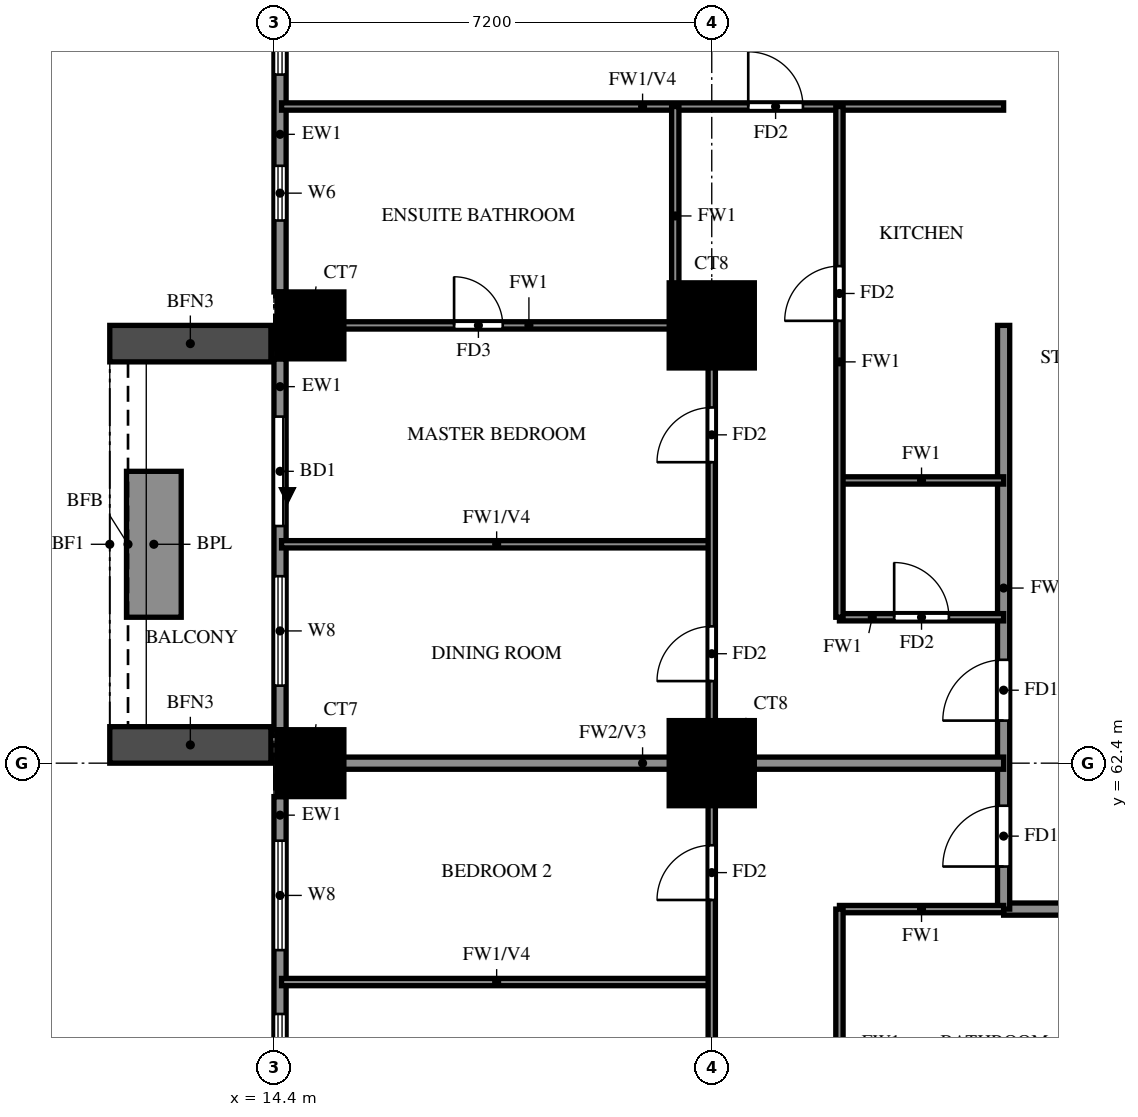
"""IFC4 building model, lengths in metres.
Left out: names, types, materials, properties, quantities, classifications, styles, units other than length and angle.
Written with IfcOpenShell. Run it as: python <this file> out.ifc"""

import sys

from ifc_helpers import new_model, si_unit, direction, frame, frame_2d, origin, origin_2d, place, context, subcontext, project, spatial, rectangle, extrude, source, transform, mapped, element, fill, save


model = new_model("IFC4")
c1 = context("Model", 3, precision=1e-05, world=origin(), true_north=direction((0.0, 1.0)))
c2 = subcontext(c1, "Body", "Model", "MODEL_VIEW")
j1 = project(units=[si_unit("LENGTHUNIT", "METRE"), si_unit("PLANEANGLEUNIT", "RADIAN")], contexts=[c1])
p1 = place(None, origin())
s1 = spatial("IfcSite", under=j1, at=p1, CompositionType="ELEMENT")
p2 = place(p1, origin())
s2 = spatial("IfcBuilding", under=s1, at=p2, CompositionType="ELEMENT")
p3 = place(p2, frame((0.0, 0.0, 37.5)))
s3 = spatial("IfcBuildingStorey", under=s2, at=p3, CompositionType="ELEMENT", Elevation=37.5)
m1 = source(origin(), c2, "Body", "SweptSolid", [
    extrude(rectangle(XDim=1.1, YDim=1.1, at=origin_2d()), origin(), (0.0, 0.0, 1.0), 3.18),
])
p4 = place(p3, frame((15.0, 62.4, 0.0), z_axis=(0.0, 0.0, 1.0), x_axis=(1.0, 0.0, 0.0)))
e1 = element("IfcColumn", 1, at=p4, inside=s3, PredefinedType="COLUMN", context=c2, shape_type="MappedRepresentation", body=[
    mapped(m1, transform((0.0, 0.0, 0.0))),
])
m2 = source(origin(), c2, "Body", "SweptSolid", [
    extrude(rectangle(XDim=1.4, YDim=1.4, at=origin_2d()), origin(), (0.0, 0.0, 1.0), 3.18),
])
p5 = place(p3, frame((21.6, 62.4, 0.0), z_axis=(0.0, 0.0, 1.0), x_axis=(1.0, 0.0, 0.0)))
e2 = element("IfcColumn", 2, at=p5, inside=s3, PredefinedType="COLUMN", context=c2, shape_type="MappedRepresentation", body=[
    mapped(m2, transform((0.0, 0.0, 0.0))),
])
p6 = place(p3, frame((15.0, 69.6, 0.0), z_axis=(0.0, 0.0, 1.0), x_axis=(1.0, 0.0, 0.0)))
e3 = element("IfcColumn", 3, at=p6, inside=s3, PredefinedType="COLUMN", context=c2, shape_type="MappedRepresentation", body=[
    mapped(m1, transform((0.0, 0.0, 0.0))),
])
p7 = place(p3, frame((21.6, 69.6, 0.0), z_axis=(0.0, 0.0, 1.0), x_axis=(1.0, 0.0, 0.0)))
e4 = element("IfcColumn", 4, at=p7, inside=s3, PredefinedType="COLUMN", context=c2, shape_type="MappedRepresentation", body=[
    mapped(m2, transform((0.0, 0.0, 0.0))),
])
p8 = place(p3, frame((14.5, 76.25, 0.0), z_axis=(0.0, 0.0, 1.0), x_axis=(0.0, -1.0, 0.0)))
e5 = element("IfcWall", 5, at=p8, inside=s3, PredefinedType="SOLIDWALL", context=c2, shape_type="SweptSolid", body=[
    extrude(rectangle(XDim=6.1, YDim=0.2, at=frame_2d((3.05, 0.0))), origin(), (0.0, 0.0, 1.0), 3.18),
])
p9 = place(p8, frame((4.025, 0.0, 1.5)))
e6 = element("IfcOpeningElement", 6, at=p9, cuts=e5, PredefinedType="OPENING", context=c2, shape_type="SweptSolid", body=[
    extrude(rectangle(XDim=0.9, YDim=0.9, at=frame_2d((0.45, 0.45))), frame((0.0, 0.11, 0.0), z_axis=(0.0, -1.0, 0.0), x_axis=(1.0, 0.0, 0.0)), (0.0, 0.0, 1.0), 0.22),
])
p10 = place(p8, frame((0.725, 0.0, 0.6)))
e7 = element("IfcOpeningElement", 7, at=p10, cuts=e5, PredefinedType="OPENING", context=c2, shape_type="SweptSolid", body=[
    extrude(rectangle(XDim=1.8, YDim=2.4, at=frame_2d((0.9, 1.2))), frame((0.0, 0.11, 0.0), z_axis=(0.0, -1.0, 0.0), x_axis=(1.0, 0.0, 0.0)), (0.0, 0.0, 1.0), 0.22),
])
p11 = place(p3, frame((14.5, 69.05, 0.0), z_axis=(0.0, 0.0, 1.0), x_axis=(0.0, -1.0, 0.0)))
e8 = element("IfcWall", 8, at=p11, inside=s3, PredefinedType="SOLIDWALL", context=c2, shape_type="SweptSolid", body=[
    extrude(rectangle(XDim=6.1, YDim=0.2, at=frame_2d((3.05, 0.0))), origin(), (0.0, 0.0, 1.0), 3.18),
])
p12 = place(p11, frame((0.95, 0.0, 0.0)))
e9 = element("IfcOpeningElement", 9, at=p12, cuts=e8, PredefinedType="OPENING", context=c2, shape_type="SweptSolid", body=[
    extrude(rectangle(XDim=1.8, YDim=2.4, at=frame_2d((0.9, 1.2))), frame((0.0, 0.11, 0.0), z_axis=(0.0, -1.0, 0.0), x_axis=(1.0, 0.0, 0.0)), (0.0, 0.0, 1.0), 0.22),
])
p13 = place(p11, frame((3.575, 0.0, 0.6)))
e10 = element("IfcOpeningElement", 10, at=p13, cuts=e8, PredefinedType="OPENING", context=c2, shape_type="SweptSolid", body=[
    extrude(rectangle(XDim=1.8, YDim=2.4, at=frame_2d((0.9, 1.2))), frame((0.0, 0.11, 0.0), z_axis=(0.0, -1.0, 0.0), x_axis=(1.0, 0.0, 0.0)), (0.0, 0.0, 1.0), 0.22),
])
p14 = place(p3, frame((14.5, 61.85, 0.0), z_axis=(0.0, 0.0, 1.0), x_axis=(0.0, -1.0, 0.0)))
e11 = element("IfcWall", 11, at=p14, inside=s3, PredefinedType="SOLIDWALL", context=c2, shape_type="SweptSolid", body=[
    extrude(rectangle(XDim=6.1, YDim=0.2, at=frame_2d((3.05, 0.0))), origin(), (0.0, 0.0, 1.0), 3.18),
])
p15 = place(p14, frame((3.575, 0.0, 0.6)))
e12 = element("IfcOpeningElement", 12, at=p15, cuts=e11, PredefinedType="OPENING", context=c2, shape_type="SweptSolid", body=[
    extrude(rectangle(XDim=1.8, YDim=2.4, at=frame_2d((0.9, 1.2))), frame((0.0, 0.11, 0.0), z_axis=(0.0, -1.0, 0.0), x_axis=(1.0, 0.0, 0.0)), (0.0, 0.0, 1.0), 0.22),
])
p16 = place(p14, frame((0.725, 0.0, 0.6)))
e13 = element("IfcOpeningElement", 13, at=p16, cuts=e11, PredefinedType="OPENING", context=c2, shape_type="SweptSolid", body=[
    extrude(rectangle(XDim=1.8, YDim=2.4, at=frame_2d((0.9, 1.2))), frame((0.0, 0.11, 0.0), z_axis=(0.0, -1.0, 0.0), x_axis=(1.0, 0.0, 0.0)), (0.0, 0.0, 1.0), 0.22),
])
for number, where, z_axis, x_axis in (
    (14, (14.35, 69.3, 0.0), (0.0, 0.0, 1.0), (-1.0, 0.0, 0.0)),
    (15, (14.35, 62.7, 0.0), (0.0, 0.0, 1.0), (-1.0, 0.0, 0.0)),
):
    element("IfcWall", number, at=place(p3, frame(where, z_axis=z_axis, x_axis=x_axis)), inside=s3, PredefinedType="SOLIDWALL", context=c2, shape_type="SweptSolid", body=[
        extrude(rectangle(XDim=2.65, YDim=0.6, at=frame_2d((1.325, 0.0))), origin(), (0.0, 0.0, 1.0), 2.85),
    ])
p17 = place(p3, frame((12.425, 67.2, 0.0), z_axis=(0.0, 0.0, 1.0), x_axis=(0.0, -1.0, 0.0)))
e16 = element("IfcWall", 16, at=p17, inside=s3, PredefinedType="SOLIDWALL", context=c2, shape_type="SweptSolid", body=[
    extrude(rectangle(XDim=2.4, YDim=0.9, at=frame_2d((1.2, 0.0))), origin(), (0.0, 0.0, 1.0), 0.9),
])
p18 = place(p3, frame((26.4, 60.0, 0.0), z_axis=(0.0, 0.0, 1.0), x_axis=(1.0, 0.0, 0.0)))
e17 = element("IfcWall", 17, at=p18, inside=s3, PredefinedType="SOLIDWALL", context=c2, shape_type="SweptSolid", body=[
    extrude(rectangle(XDim=7.2, YDim=0.2, at=frame_2d((3.6, 0.0))), origin(), (0.0, 0.0, 1.0), 3.18),
])
p19 = place(p3, frame((26.4, 60.0, 0.0), z_axis=(0.0, 0.0, 1.0), x_axis=(0.0, 1.0, 0.0)))
e18 = element("IfcWall", 18, at=p19, inside=s3, PredefinedType="SOLIDWALL", context=c2, shape_type="SweptSolid", body=[
    extrude(rectangle(XDim=9.6, YDim=0.2, at=frame_2d((4.8, 0.0))), origin(), (0.0, 0.0, 1.0), 3.18),
])
p20 = place(p19, frame((0.7, 0.0, 0.0)))
e19 = element("IfcOpeningElement", 19, at=p20, cuts=e18, PredefinedType="OPENING", context=c2, shape_type="SweptSolid", body=[
    extrude(rectangle(XDim=1.0, YDim=2.1, at=frame_2d((0.5, 1.05))), frame((0.0, 0.11, 0.0), z_axis=(0.0, -1.0, 0.0), x_axis=(1.0, 0.0, 0.0)), (0.0, 0.0, 1.0), 0.22),
])
p21 = place(p19, frame((3.1, 0.0, 0.0)))
e20 = element("IfcOpeningElement", 20, at=p21, cuts=e18, PredefinedType="OPENING", context=c2, shape_type="SweptSolid", body=[
    extrude(rectangle(XDim=1.0, YDim=2.1, at=frame_2d((0.5, 1.05))), frame((0.0, 0.11, 0.0), z_axis=(0.0, -1.0, 0.0), x_axis=(1.0, 0.0, 0.0)), (0.0, 0.0, 1.0), 0.22),
])
p22 = place(p3, frame((14.525, 62.4, 0.0), z_axis=(0.0, 0.0, 1.0), x_axis=(1.0, 0.0, 0.0)))
e21 = element("IfcWall", 21, at=p22, inside=s3, PredefinedType="SOLIDWALL", context=c2, shape_type="SweptSolid", body=[
    extrude(rectangle(XDim=11.875, YDim=0.2, at=frame_2d((5.938, 0.0))), origin(), (0.0, 0.0, 1.0), 3.18),
])
p23 = place(p3, frame((14.525, 58.8, 0.0), z_axis=(0.0, 0.0, 1.0), x_axis=(1.0, 0.0, 0.0)))
e22 = element("IfcWall", 22, at=p23, inside=s3, PredefinedType="PARTITIONING", context=c2, shape_type="SweptSolid", body=[
    extrude(rectangle(XDim=7.075, YDim=0.12, at=frame_2d((3.538, 0.0))), origin(), (0.0, 0.0, 1.0), 2.28),
])
p24 = place(p3, frame((23.7, 60.0, 0.0), z_axis=(0.0, 0.0, 1.0), x_axis=(1.0, 0.0, 0.0)))
e23 = element("IfcWall", 23, at=p24, inside=s3, PredefinedType="PARTITIONING", context=c2, shape_type="SweptSolid", body=[
    extrude(rectangle(XDim=2.7, YDim=0.12, at=frame_2d((1.35, 0.0))), origin(), (0.0, 0.0, 1.0), 3.18),
])
p25 = place(p3, frame((23.7, 64.8, 0.0), z_axis=(0.0, 0.0, 1.0), x_axis=(1.0, 0.0, 0.0)))
e24 = element("IfcWall", 24, at=p25, inside=s3, PredefinedType="PARTITIONING", context=c2, shape_type="SweptSolid", body=[
    extrude(rectangle(XDim=2.7, YDim=0.12, at=frame_2d((1.35, 0.0))), origin(), (0.0, 0.0, 1.0), 3.18),
])
p26 = place(p25, frame((0.9, 0.0, 0.0)))
e25 = element("IfcOpeningElement", 25, at=p26, cuts=e24, PredefinedType="OPENING", context=c2, shape_type="SweptSolid", body=[
    extrude(rectangle(XDim=0.9, YDim=2.1, at=frame_2d((0.45, 1.05))), frame((0.0, 0.07, 0.0), z_axis=(0.0, -1.0, 0.0), x_axis=(1.0, 0.0, 0.0)), (0.0, 0.0, 1.0), 0.14),
])
p27 = place(p3, frame((14.525, 66.0, 0.0), z_axis=(0.0, 0.0, 1.0), x_axis=(1.0, 0.0, 0.0)))
e26 = element("IfcWall", 26, at=p27, inside=s3, PredefinedType="PARTITIONING", context=c2, shape_type="SweptSolid", body=[
    extrude(rectangle(XDim=7.075, YDim=0.12, at=frame_2d((3.538, 0.0))), origin(), (0.0, 0.0, 1.0), 2.28),
])
p28 = place(p3, frame((23.7, 67.05, 0.0), z_axis=(0.0, 0.0, 1.0), x_axis=(1.0, 0.0, 0.0)))
e27 = element("IfcWall", 27, at=p28, inside=s3, PredefinedType="PARTITIONING", context=c2, shape_type="SweptSolid", body=[
    extrude(rectangle(XDim=2.7, YDim=0.12, at=frame_2d((1.35, 0.0))), origin(), (0.0, 0.0, 1.0), 3.18),
])
p29 = place(p3, frame((14.525, 69.6, 0.0), z_axis=(0.0, 0.0, 1.0), x_axis=(1.0, 0.0, 0.0)))
e28 = element("IfcWall", 28, at=p29, inside=s3, PredefinedType="PARTITIONING", context=c2, shape_type="SweptSolid", body=[
    extrude(rectangle(XDim=7.075, YDim=0.12, at=frame_2d((3.538, 0.0))), origin(), (0.0, 0.0, 1.0), 3.18),
])
p30 = place(p29, frame((2.837, 0.0, 0.0)))
e29 = element("IfcOpeningElement", 29, at=p30, cuts=e28, PredefinedType="OPENING", context=c2, shape_type="SweptSolid", body=[
    extrude(rectangle(XDim=0.8, YDim=2.1, at=frame_2d((0.4, 1.05))), frame((0.0, 0.07, 0.0), z_axis=(0.0, -1.0, 0.0), x_axis=(1.0, 0.0, 0.0)), (0.0, 0.0, 1.0), 0.14),
])
p31 = place(p3, frame((14.525, 73.2, 0.0), z_axis=(0.0, 0.0, 1.0), x_axis=(1.0, 0.0, 0.0)))
e30 = element("IfcWall", 30, at=p31, inside=s3, PredefinedType="PARTITIONING", context=c2, shape_type="SweptSolid", body=[
    extrude(rectangle(XDim=11.875, YDim=0.12, at=frame_2d((5.938, 0.0))), origin(), (0.0, 0.0, 1.0), 2.28),
])
p32 = place(p31, frame((7.675, 0.0, 0.0)))
e31 = element("IfcOpeningElement", 31, at=p32, cuts=e30, PredefinedType="OPENING", context=c2, shape_type="SweptSolid", body=[
    extrude(rectangle(XDim=0.9, YDim=2.1, at=frame_2d((0.45, 1.05))), frame((0.0, 0.07, 0.0), z_axis=(0.0, -1.0, 0.0), x_axis=(1.0, 0.0, 0.0)), (0.0, 0.0, 1.0), 0.14),
])
p33 = place(p3, frame((21.0, 69.6, 0.0), z_axis=(0.0, 0.0, 1.0), x_axis=(0.0, 1.0, 0.0)))
e32 = element("IfcWall", 32, at=p33, inside=s3, PredefinedType="PARTITIONING", context=c2, shape_type="SweptSolid", body=[
    extrude(rectangle(XDim=3.6, YDim=0.12, at=frame_2d((1.8, 0.0))), origin(), (0.0, 0.0, 1.0), 3.18),
])
p34 = place(p3, frame((21.6, 33.725, 0.0), z_axis=(0.0, 0.0, 1.0), x_axis=(0.0, 1.0, 0.0)))
e33 = element("IfcWall", 33, at=p34, inside=s3, PredefinedType="PARTITIONING", context=c2, shape_type="SweptSolid", body=[
    extrude(rectangle(XDim=35.875, YDim=0.12, at=frame_2d((17.938, 0.0))), origin(), (0.0, 0.0, 1.0), 3.18),
])
p35 = place(p34, frame((7.775, 0.0, 0.0)))
e34 = element("IfcOpeningElement", 34, at=p35, cuts=e33, PredefinedType="OPENING", context=c2, shape_type="SweptSolid", body=[
    extrude(rectangle(XDim=0.9, YDim=2.1, at=frame_2d((0.45, 1.05))), frame((0.0, 0.07, 0.0), z_axis=(0.0, -1.0, 0.0), x_axis=(1.0, 0.0, 0.0)), (0.0, 0.0, 1.0), 0.14),
])
p36 = place(p34, frame((15.625, 0.0, 0.0)))
e35 = element("IfcOpeningElement", 35, at=p36, cuts=e33, PredefinedType="OPENING", context=c2, shape_type="SweptSolid", body=[
    extrude(rectangle(XDim=0.9, YDim=2.1, at=frame_2d((0.45, 1.05))), frame((0.0, 0.07, 0.0), z_axis=(0.0, -1.0, 0.0), x_axis=(1.0, 0.0, 0.0)), (0.0, 0.0, 1.0), 0.14),
])
p37 = place(p34, frame((22.225, 0.0, 0.0)))
e36 = element("IfcOpeningElement", 36, at=p37, cuts=e33, PredefinedType="OPENING", context=c2, shape_type="SweptSolid", body=[
    extrude(rectangle(XDim=1.5, YDim=2.1, at=frame_2d((0.75, 1.05))), frame((0.0, 0.07, 0.0), z_axis=(0.0, -1.0, 0.0), x_axis=(1.0, 0.0, 0.0)), (0.0, 0.0, 1.0), 0.14),
])
p38 = place(p34, frame((26.425, 0.0, 0.0)))
e37 = element("IfcOpeningElement", 37, at=p38, cuts=e33, PredefinedType="OPENING", context=c2, shape_type="SweptSolid", body=[
    extrude(rectangle(XDim=0.9, YDim=2.1, at=frame_2d((0.45, 1.05))), frame((0.0, 0.07, 0.0), z_axis=(0.0, -1.0, 0.0), x_axis=(1.0, 0.0, 0.0)), (0.0, 0.0, 1.0), 0.14),
])
p39 = place(p34, frame((30.025, 0.0, 0.0)))
e38 = element("IfcOpeningElement", 38, at=p39, cuts=e33, PredefinedType="OPENING", context=c2, shape_type="SweptSolid", body=[
    extrude(rectangle(XDim=0.9, YDim=2.1, at=frame_2d((0.45, 1.05))), frame((0.0, 0.07, 0.0), z_axis=(0.0, -1.0, 0.0), x_axis=(1.0, 0.0, 0.0)), (0.0, 0.0, 1.0), 0.14),
])
p40 = place(p34, frame((33.625, 0.0, 0.0)))
e39 = element("IfcOpeningElement", 39, at=p40, cuts=e33, PredefinedType="OPENING", context=c2, shape_type="SweptSolid", body=[
    extrude(rectangle(XDim=0.9, YDim=2.1, at=frame_2d((0.45, 1.05))), frame((0.0, 0.07, 0.0), z_axis=(0.0, -1.0, 0.0), x_axis=(1.0, 0.0, 0.0)), (0.0, 0.0, 1.0), 0.14),
])
p41 = place(p3, frame((23.7, 55.6, 0.0), z_axis=(0.0, 0.0, 1.0), x_axis=(0.0, 1.0, 0.0)))
e40 = element("IfcWall", 40, at=p41, inside=s3, PredefinedType="PARTITIONING", context=c2, shape_type="SweptSolid", body=[
    extrude(rectangle(XDim=4.4, YDim=0.12, at=frame_2d((2.2, 0.0))), origin(), (0.0, 0.0, 1.0), 3.18),
])
p42 = place(p3, frame((23.7, 64.8, 0.0), z_axis=(0.0, 0.0, 1.0), x_axis=(0.0, 1.0, 0.0)))
e41 = element("IfcWall", 41, at=p42, inside=s3, PredefinedType="PARTITIONING", context=c2, shape_type="SweptSolid", body=[
    extrude(rectangle(XDim=8.4, YDim=0.12, at=frame_2d((4.2, 0.0))), origin(), (0.0, 0.0, 1.0), 3.18),
])
p43 = place(p42, frame((4.875, 0.0, 0.0)))
e42 = element("IfcOpeningElement", 42, at=p43, cuts=e41, PredefinedType="OPENING", context=c2, shape_type="SweptSolid", body=[
    extrude(rectangle(XDim=0.9, YDim=2.1, at=frame_2d((0.45, 1.05))), frame((0.0, 0.07, 0.0), z_axis=(0.0, -1.0, 0.0), x_axis=(1.0, 0.0, 0.0)), (0.0, 0.0, 1.0), 0.14),
])
p44 = place(p9, origin())
e43 = element("IfcWindow", 43, at=p44, inside=s3, PartitioningType="SINGLE_PANEL", PredefinedType="WINDOW", context=c2, shape_type="SweptSolid", body=[
    extrude(rectangle(XDim=0.9, YDim=0.9, at=frame_2d((0.45, 0.45))), frame((0.0, 0.03, 0.0), z_axis=(0.0, -1.0, 0.0), x_axis=(1.0, 0.0, 0.0)), (0.0, 0.0, 1.0), 0.06),
])
fill(e6, e43)
p45 = place(p10, origin())
e44 = element("IfcWindow", 44, at=p45, inside=s3, PartitioningType="DOUBLE_PANEL_VERTICAL", PredefinedType="WINDOW", context=c2, shape_type="SweptSolid", body=[
    extrude(rectangle(XDim=1.8, YDim=2.4, at=frame_2d((0.9, 1.2))), frame((0.0, 0.03, 0.0), z_axis=(0.0, -1.0, 0.0), x_axis=(1.0, 0.0, 0.0)), (0.0, 0.0, 1.0), 0.06),
])
fill(e7, e44)
p46 = place(p12, origin())
e45 = element("IfcDoor", 45, at=p46, inside=s3, OperationType="DOUBLE_DOOR_SLIDING", PredefinedType="DOOR", context=c2, shape_type="SweptSolid", body=[
    extrude(rectangle(XDim=1.8, YDim=2.4, at=frame_2d((0.9, 1.2))), frame((0.0, 0.025, 0.0), z_axis=(0.0, -1.0, 0.0), x_axis=(1.0, 0.0, 0.0)), (0.0, 0.0, 1.0), 0.05),
])
fill(e9, e45)
p47 = place(p13, origin())
e46 = element("IfcWindow", 46, at=p47, inside=s3, PartitioningType="DOUBLE_PANEL_VERTICAL", PredefinedType="WINDOW", context=c2, shape_type="SweptSolid", body=[
    extrude(rectangle(XDim=1.8, YDim=2.4, at=frame_2d((0.9, 1.2))), frame((0.0, 0.03, 0.0), z_axis=(0.0, -1.0, 0.0), x_axis=(1.0, 0.0, 0.0)), (0.0, 0.0, 1.0), 0.06),
])
fill(e10, e46)
p48 = place(p15, origin())
e47 = element("IfcWindow", 47, at=p48, inside=s3, PartitioningType="DOUBLE_PANEL_VERTICAL", PredefinedType="WINDOW", context=c2, shape_type="SweptSolid", body=[
    extrude(rectangle(XDim=1.8, YDim=2.4, at=frame_2d((0.9, 1.2))), frame((0.0, 0.03, 0.0), z_axis=(0.0, -1.0, 0.0), x_axis=(1.0, 0.0, 0.0)), (0.0, 0.0, 1.0), 0.06),
])
fill(e12, e47)
p49 = place(p16, origin())
e48 = element("IfcWindow", 48, at=p49, inside=s3, PartitioningType="DOUBLE_PANEL_VERTICAL", PredefinedType="WINDOW", context=c2, shape_type="SweptSolid", body=[
    extrude(rectangle(XDim=1.8, YDim=2.4, at=frame_2d((0.9, 1.2))), frame((0.0, 0.03, 0.0), z_axis=(0.0, -1.0, 0.0), x_axis=(1.0, 0.0, 0.0)), (0.0, 0.0, 1.0), 0.06),
])
fill(e13, e48)
p50 = place(p20, origin())
e49 = element("IfcDoor", 49, at=p50, inside=s3, OperationType="SINGLE_SWING_LEFT", PredefinedType="DOOR", context=c2, shape_type="SweptSolid", body=[
    extrude(rectangle(XDim=1.0, YDim=2.1, at=frame_2d((0.5, 1.05))), frame((0.0, 0.025, 0.0), z_axis=(0.0, -1.0, 0.0), x_axis=(1.0, 0.0, 0.0)), (0.0, 0.0, 1.0), 0.05),
])
fill(e19, e49)
p51 = place(p38, origin())
e50 = element("IfcDoor", 50, at=p51, inside=s3, OperationType="SINGLE_SWING_LEFT", PredefinedType="DOOR", context=c2, shape_type="SweptSolid", body=[
    extrude(rectangle(XDim=0.9, YDim=2.1, at=frame_2d((0.45, 1.05))), frame((0.0, 0.025, 0.0), z_axis=(0.0, -1.0, 0.0), x_axis=(1.0, 0.0, 0.0)), (0.0, 0.0, 1.0), 0.05),
])
fill(e37, e50)
p52 = place(p21, origin())
e51 = element("IfcDoor", 51, at=p52, inside=s3, OperationType="SINGLE_SWING_LEFT", PredefinedType="DOOR", context=c2, shape_type="SweptSolid", body=[
    extrude(rectangle(XDim=1.0, YDim=2.1, at=frame_2d((0.5, 1.05))), frame((0.0, 0.025, 0.0), z_axis=(0.0, -1.0, 0.0), x_axis=(1.0, 0.0, 0.0)), (0.0, 0.0, 1.0), 0.05),
])
fill(e20, e51)
p53 = place(p39, origin())
e52 = element("IfcDoor", 52, at=p53, inside=s3, OperationType="SINGLE_SWING_RIGHT", PredefinedType="DOOR", context=c2, shape_type="SweptSolid", body=[
    extrude(rectangle(XDim=0.9, YDim=2.1, at=frame_2d((0.45, 1.05))), frame((0.0, 0.025, 0.0), z_axis=(0.0, -1.0, 0.0), x_axis=(1.0, 0.0, 0.0)), (0.0, 0.0, 1.0), 0.05),
])
fill(e38, e52)
p54 = place(p40, origin())
e53 = element("IfcDoor", 53, at=p54, inside=s3, OperationType="SINGLE_SWING_LEFT", PredefinedType="DOOR", context=c2, shape_type="SweptSolid", body=[
    extrude(rectangle(XDim=0.9, YDim=2.1, at=frame_2d((0.45, 1.05))), frame((0.0, 0.025, 0.0), z_axis=(0.0, -1.0, 0.0), x_axis=(1.0, 0.0, 0.0)), (0.0, 0.0, 1.0), 0.05),
])
fill(e39, e53)
p55 = place(p30, origin())
e54 = element("IfcDoor", 54, at=p55, inside=s3, OperationType="SINGLE_SWING_LEFT", PredefinedType="DOOR", context=c2, shape_type="SweptSolid", body=[
    extrude(rectangle(XDim=0.8, YDim=2.1, at=frame_2d((0.4, 1.05))), frame((0.0, 0.025, 0.0), z_axis=(0.0, -1.0, 0.0), x_axis=(1.0, 0.0, 0.0)), (0.0, 0.0, 1.0), 0.05),
])
fill(e29, e54)
p56 = place(p32, origin())
e55 = element("IfcDoor", 55, at=p56, inside=s3, OperationType="SINGLE_SWING_RIGHT", PredefinedType="DOOR", context=c2, shape_type="SweptSolid", body=[
    extrude(rectangle(XDim=0.9, YDim=2.1, at=frame_2d((0.45, 1.05))), frame((0.0, 0.025, 0.0), z_axis=(0.0, -1.0, 0.0), x_axis=(1.0, 0.0, 0.0)), (0.0, 0.0, 1.0), 0.05),
])
fill(e31, e55)
p57 = place(p26, origin())
e56 = element("IfcDoor", 56, at=p57, inside=s3, OperationType="SINGLE_SWING_LEFT", PredefinedType="DOOR", context=c2, shape_type="SweptSolid", body=[
    extrude(rectangle(XDim=0.9, YDim=2.1, at=frame_2d((0.45, 1.05))), frame((0.0, 0.025, 0.0), z_axis=(0.0, -1.0, 0.0), x_axis=(1.0, 0.0, 0.0)), (0.0, 0.0, 1.0), 0.05),
])
fill(e25, e56)
p58 = place(p43, origin())
e57 = element("IfcDoor", 57, at=p58, inside=s3, OperationType="SINGLE_SWING_LEFT", PredefinedType="DOOR", context=c2, shape_type="SweptSolid", body=[
    extrude(rectangle(XDim=0.9, YDim=2.1, at=frame_2d((0.45, 1.05))), frame((0.0, 0.025, 0.0), z_axis=(0.0, -1.0, 0.0), x_axis=(1.0, 0.0, 0.0)), (0.0, 0.0, 1.0), 0.05),
])
fill(e42, e57)
save(model, sys.argv[1])
